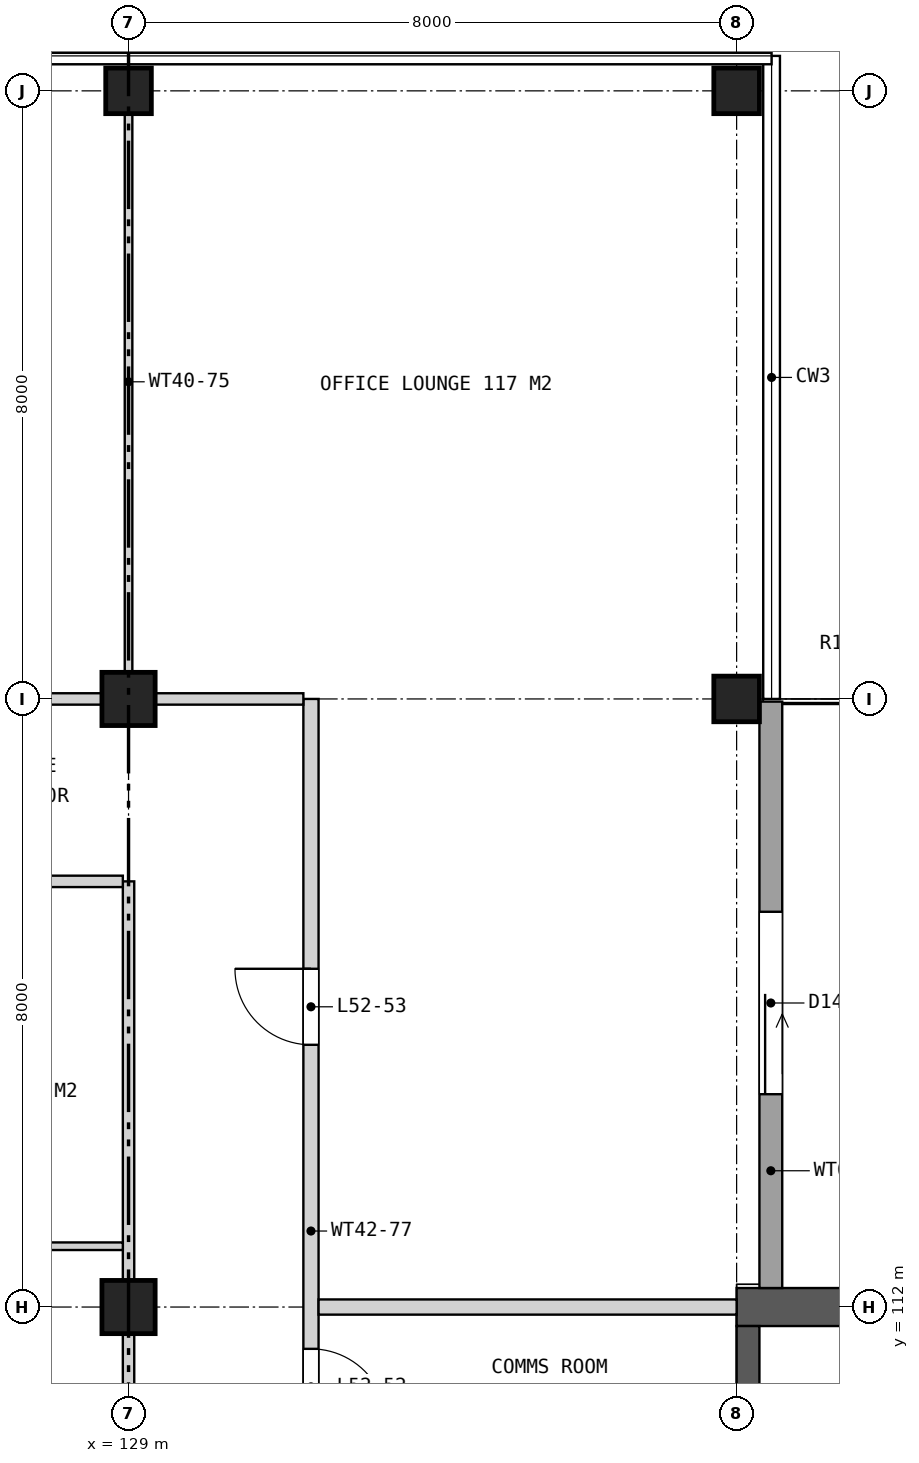
"""IFC4 building model, lengths in metres.
Left out: names, types, materials, properties, quantities, classifications, styles, units other than length and angle.
Written with IfcOpenShell. Run it as: python <this file> out.ifc"""

import sys

from ifc_helpers import new_model, si_unit, direction, frame, frame_2d, origin, origin_2d, place, context, subcontext, project, spatial, rectangle, extrude, element, fill, save


model = new_model("IFC4")
c1 = context("Model", 3, precision=1e-05, world=origin(), true_north=direction((0.0, 1.0)))
c2 = subcontext(c1, "Body", "Model", "MODEL_VIEW")
j1 = project(units=[si_unit("LENGTHUNIT", "METRE"), si_unit("PLANEANGLEUNIT", "RADIAN")], contexts=[c1])
p1 = place(None, origin())
s1 = spatial("IfcSite", under=j1, at=p1, CompositionType="ELEMENT")
p2 = place(p1, origin())
s2 = spatial("IfcBuilding", under=s1, at=p2, CompositionType="ELEMENT")
p3 = place(p2, frame((0.0, 0.0, 245.1)))
s3 = spatial("IfcBuildingStorey", under=s2, at=p3, CompositionType="ELEMENT", Elevation=245.1)
for number, where, z_axis, x_axis in (
    (1, (129.0, 112.0, 0.0), (0.0, 0.0, 1.0), (1.0, 0.0, 0.0)),
    (2, (129.0, 120.0, 0.0), (0.0, 0.0, 1.0), (1.0, 0.0, 0.0)),
):
    element("IfcColumn", number, at=place(p3, frame(where, z_axis=z_axis, x_axis=x_axis)), inside=s3, PredefinedType="COLUMN", context=c2, shape_type="SweptSolid", body=[
        extrude(rectangle(XDim=0.7, YDim=0.7, at=origin_2d()), origin(), (0.0, 0.0, 1.0), 4.2),
    ])
for number, where, z_axis, x_axis in (
    (3, (129.0, 128.0, 0.0), (0.0, 0.0, 1.0), (1.0, 0.0, 0.0)),
    (4, (137.0, 120.0, 0.0), (0.0, 0.0, 1.0), (1.0, 0.0, 0.0)),
    (5, (137.0, 128.0, 0.0), (0.0, 0.0, 1.0), (1.0, 0.0, 0.0)),
):
    element("IfcColumn", number, at=place(p3, frame(where, z_axis=z_axis, x_axis=x_axis)), inside=s3, PredefinedType="COLUMN", context=c2, shape_type="SweptSolid", body=[
        extrude(rectangle(XDim=0.6, YDim=0.6, at=origin_2d()), origin(), (0.0, 0.0, 1.0), 4.2),
    ])
p4 = place(p3, frame((137.0, 112.0, 0.0), z_axis=(0.0, 0.0, 1.0), x_axis=(1.0, 0.0, 0.0)))
e6 = element("IfcWall", 6, at=p4, inside=s3, PredefinedType="SHEAR", context=c2, shape_type="SweptSolid", body=[
    extrude(rectangle(XDim=7.1, YDim=0.5, at=frame_2d((3.55, 0.0))), origin(), (0.0, 0.0, 1.0), 4.2),
])
p5 = place(p3, frame((137.15, 105.7, 0.0), z_axis=(0.0, 0.0, 1.0), x_axis=(0.0, 1.0, 0.0)))
e7 = element("IfcWall", 7, at=p5, inside=s3, PredefinedType="SHEAR", context=c2, shape_type="SweptSolid", body=[
    extrude(rectangle(XDim=6.05, YDim=0.3, at=frame_2d((3.025, 0.0))), origin(), (0.0, 0.0, 1.0), 4.2),
])
p6 = place(p3, frame((137.45, 112.25, 0.0), z_axis=(0.0, 0.0, 1.0), x_axis=(0.0, 1.0, 0.0)))
e8 = element("IfcWall", 8, at=p6, inside=s3, PredefinedType="SOLIDWALL", context=c2, shape_type="SweptSolid", body=[
    extrude(rectangle(XDim=7.715, YDim=0.3, at=frame_2d((3.857, 0.0))), origin(), (0.0, 0.0, 1.0), 3.9),
])
p7 = place(p6, frame((2.55, 0.0, 0.0)))
e9 = element("IfcOpeningElement", 9, at=p7, cuts=e8, PredefinedType="OPENING", context=c2, shape_type="SweptSolid", body=[
    extrude(rectangle(XDim=2.4, YDim=2.4, at=frame_2d((1.2, 1.2))), frame((0.0, 0.16, 0.0), z_axis=(0.0, -1.0, 0.0), x_axis=(1.0, 0.0, 0.0)), (0.0, 0.0, 1.0), 0.32),
])
p8 = place(p3, frame((129.0, 82.4, 0.0), z_axis=(0.0, 0.0, 1.0), x_axis=(0.0, 1.0, 0.0)))
e10 = element("IfcWall", 10, at=p8, inside=s3, PredefinedType="PARTITIONING", context=c2, shape_type="SweptSolid", body=[
    extrude(rectangle(XDim=35.2, YDim=0.15, at=frame_2d((17.6, 0.0))), origin(), (0.0, 0.0, 1.0), 3.443),
])
p9 = place(p8, frame((18.75, 0.0, 0.0)))
e11 = element("IfcOpeningElement", 11, at=p9, cuts=e10, PredefinedType="OPENING", context=c2, shape_type="SweptSolid", body=[
    extrude(rectangle(XDim=1.0, YDim=2.1, at=frame_2d((0.5, 1.05))), frame((0.0, 0.085, 0.0), z_axis=(0.0, -1.0, 0.0), x_axis=(1.0, 0.0, 0.0)), (0.0, 0.0, 1.0), 0.17),
])
p10 = place(p3, frame((129.0, 120.075, 0.0), z_axis=(0.0, 0.0, 1.0), x_axis=(0.0, 1.0, 0.0)))
e12 = element("IfcWall", 12, at=p10, inside=s3, PredefinedType="PARTITIONING", context=c2, shape_type="SweptSolid", body=[
    extrude(rectangle(XDim=8.195, YDim=0.1, at=frame_2d((4.098, 0.0))), origin(), (0.0, 0.0, 1.0), 3.443),
])
p11 = place(p3, frame((131.4, 106.0, 0.0), z_axis=(0.0, 0.0, 1.0), x_axis=(0.0, 1.0, 0.0)))
e13 = element("IfcWall", 13, at=p11, inside=s3, PredefinedType="SOLIDWALL", context=c2, shape_type="SweptSolid", body=[
    extrude(rectangle(XDim=14.0, YDim=0.2, at=frame_2d((7.0, 0.0))), origin(), (0.0, 0.0, 1.0), 3.443),
])
p12 = place(p11, frame((0.45, 0.0, 0.0)))
e14 = element("IfcOpeningElement", 14, at=p12, cuts=e13, PredefinedType="OPENING", context=c2, shape_type="SweptSolid", body=[
    extrude(rectangle(XDim=1.0, YDim=2.1, at=frame_2d((0.5, 1.05))), frame((0.0, 0.11, 0.0), z_axis=(0.0, -1.0, 0.0), x_axis=(1.0, 0.0, 0.0)), (0.0, 0.0, 1.0), 0.22),
])
p13 = place(p11, frame((2.45, 0.0, 0.0)))
e15 = element("IfcOpeningElement", 15, at=p13, cuts=e13, PredefinedType="OPENING", context=c2, shape_type="SweptSolid", body=[
    extrude(rectangle(XDim=1.0, YDim=2.1, at=frame_2d((0.5, 1.05))), frame((0.0, 0.11, 0.0), z_axis=(0.0, -1.0, 0.0), x_axis=(1.0, 0.0, 0.0)), (0.0, 0.0, 1.0), 0.22),
])
p14 = place(p11, frame((4.45, 0.0, 0.0)))
e16 = element("IfcOpeningElement", 16, at=p14, cuts=e13, PredefinedType="OPENING", context=c2, shape_type="SweptSolid", body=[
    extrude(rectangle(XDim=1.0, YDim=2.1, at=frame_2d((0.5, 1.05))), frame((0.0, 0.11, 0.0), z_axis=(0.0, -1.0, 0.0), x_axis=(1.0, 0.0, 0.0)), (0.0, 0.0, 1.0), 0.22),
])
p15 = place(p11, frame((9.45, 0.0, 0.0)))
e17 = element("IfcOpeningElement", 17, at=p15, cuts=e13, PredefinedType="OPENING", context=c2, shape_type="SweptSolid", body=[
    extrude(rectangle(XDim=1.0, YDim=2.1, at=frame_2d((0.5, 1.05))), frame((0.0, 0.11, 0.0), z_axis=(0.0, -1.0, 0.0), x_axis=(1.0, 0.0, 0.0)), (0.0, 0.0, 1.0), 0.22),
])
p16 = place(p3, frame((131.5, 112.0, 0.0), z_axis=(0.0, 0.0, 1.0), x_axis=(1.0, 0.0, 0.0)))
e18 = element("IfcWall", 18, at=p16, inside=s3, PredefinedType="SOLIDWALL", context=c2, shape_type="SweptSolid", body=[
    extrude(rectangle(XDim=5.5, YDim=0.2, at=frame_2d((2.75, 0.0))), origin(), (0.0, 0.0, 1.0), 3.443),
])
p17 = place(p3, frame((121.075, 112.8, 0.0), z_axis=(0.0, 0.0, 1.0), x_axis=(1.0, 0.0, 0.0)))
e19 = element("IfcWall", 19, at=p17, inside=s3, PredefinedType="PARTITIONING", context=c2, shape_type="SweptSolid", body=[
    extrude(rectangle(XDim=7.85, YDim=0.1, at=frame_2d((3.925, 0.0))), origin(), (0.0, 0.0, 1.0), 3.443),
])
p18 = place(p3, frame((121.075, 117.6, 0.0), z_axis=(0.0, 0.0, 1.0), x_axis=(1.0, 0.0, 0.0)))
e20 = element("IfcWall", 20, at=p18, inside=s3, PredefinedType="PARTITIONING", context=c2, shape_type="SweptSolid", body=[
    extrude(rectangle(XDim=7.85, YDim=0.15, at=frame_2d((3.925, 0.0))), origin(), (0.0, 0.0, 1.0), 3.443),
])
p19 = place(p18, frame((3.45, 0.0, 0.0)))
e21 = element("IfcOpeningElement", 21, at=p19, cuts=e20, PredefinedType="OPENING", context=c2, shape_type="SweptSolid", body=[
    extrude(rectangle(XDim=1.0, YDim=2.1, at=frame_2d((0.5, 1.05))), frame((0.0, 0.085, 0.0), z_axis=(0.0, -1.0, 0.0), x_axis=(1.0, 0.0, 0.0)), (0.0, 0.0, 1.0), 0.17),
])
p20 = place(p3, frame((112.73, 120.0, 0.0), z_axis=(0.0, 0.0, 1.0), x_axis=(1.0, 0.0, 0.0)))
e22 = element("IfcWall", 22, at=p20, inside=s3, PredefinedType="PARTITIONING", context=c2, shape_type="SweptSolid", body=[
    extrude(rectangle(XDim=18.57, YDim=0.15, at=frame_2d((9.285, 0.0))), origin(), (0.0, 0.0, 1.0), 3.443),
])
p21 = place(p20, frame((11.32, 0.0, 0.0)))
e23 = element("IfcOpeningElement", 23, at=p21, cuts=e22, PredefinedType="OPENING", context=c2, shape_type="SweptSolid", body=[
    extrude(rectangle(XDim=1.8, YDim=2.1, at=frame_2d((0.9, 1.05))), frame((0.0, 0.085, 0.0), z_axis=(0.0, -1.0, 0.0), x_axis=(1.0, 0.0, 0.0)), (0.0, 0.0, 1.0), 0.17),
])
p22 = place(p7, frame((2.4, 0.0, 0.0), z_axis=(0.0, 0.0, 1.0), x_axis=(-1.0, 0.0, 0.0)))
e24 = element("IfcDoor", 24, at=p22, inside=s3, OperationType="SLIDING_TO_LEFT", PredefinedType="DOOR", context=c2, shape_type="SweptSolid", body=[
    extrude(rectangle(XDim=2.4, YDim=2.4, at=frame_2d((1.2, 1.2))), frame((0.0, 0.025, 0.0), z_axis=(0.0, -1.0, 0.0), x_axis=(1.0, 0.0, 0.0)), (0.0, 0.0, 1.0), 0.05),
])
fill(e9, e24)
p23 = place(p14, frame((1.0, 0.0, 0.0), z_axis=(0.0, 0.0, 1.0), x_axis=(-1.0, 0.0, 0.0)))
e25 = element("IfcDoor", 25, at=p23, inside=s3, OperationType="SINGLE_SWING_RIGHT", PredefinedType="DOOR", context=c2, shape_type="SweptSolid", body=[
    extrude(rectangle(XDim=1.0, YDim=2.1, at=frame_2d((0.5, 1.05))), frame((0.0, 0.025, 0.0), z_axis=(0.0, -1.0, 0.0), x_axis=(1.0, 0.0, 0.0)), (0.0, 0.0, 1.0), 0.05),
])
fill(e16, e25)
p24 = place(p15, origin())
e26 = element("IfcDoor", 26, at=p24, inside=s3, OperationType="SINGLE_SWING_RIGHT", PredefinedType="DOOR", context=c2, shape_type="SweptSolid", body=[
    extrude(rectangle(XDim=1.0, YDim=2.1, at=frame_2d((0.5, 1.05))), frame((0.0, 0.025, 0.0), z_axis=(0.0, -1.0, 0.0), x_axis=(1.0, 0.0, 0.0)), (0.0, 0.0, 1.0), 0.05),
])
fill(e17, e26)
save(model, sys.argv[1])
